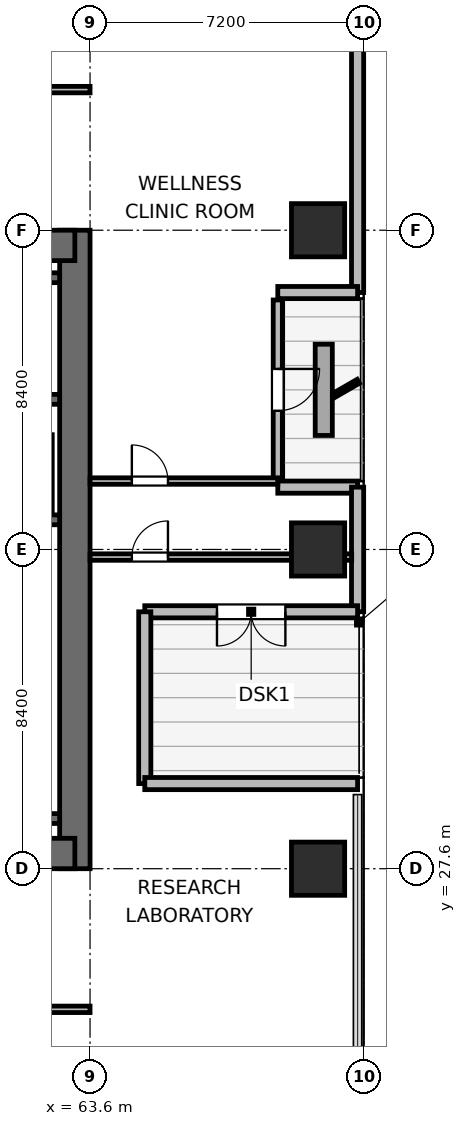
"""IFC4 building model, lengths in metres.
Left out: names, types, materials, properties, quantities, classifications, styles, units other than length and angle.
Written with IfcOpenShell. Run it as: python <this file> out.ifc"""

import sys

from ifc_helpers import new_model, si_unit, direction, frame, frame_2d, origin, origin_2d, place, context, subcontext, project, spatial, rectangle, extrude, element, fill, save


model = new_model("IFC4")
c1 = context("Model", 3, precision=1e-05, world=origin(), true_north=direction((0.0, 1.0)))
c2 = subcontext(c1, "Body", "Model", "MODEL_VIEW")
j1 = project(units=[si_unit("LENGTHUNIT", "METRE"), si_unit("PLANEANGLEUNIT", "RADIAN")], contexts=[c1])
p1 = place(None, origin())
s1 = spatial("IfcSite", under=j1, at=p1, CompositionType="ELEMENT")
p2 = place(p1, origin())
s2 = spatial("IfcBuilding", under=s1, at=p2, CompositionType="ELEMENT")
p3 = place(p2, frame((0.0, 0.0, 125.4)))
s3 = spatial("IfcBuildingStorey", under=s2, at=p3, CompositionType="ELEMENT", Elevation=125.4)
p4 = place(p3, frame((63.2, 27.6, 0.0), z_axis=(0.0, 0.0, 1.0), x_axis=(0.0, 1.0, 0.0)))
e1 = element("IfcWall", 1, at=p4, inside=s3, PredefinedType="SHEAR", context=c2, shape_type="SweptSolid", body=[
    extrude(rectangle(XDim=16.8, YDim=0.8, at=frame_2d((8.4, 0.0))), origin(), (0.0, 0.0, 1.0), 4.5),
])
p5 = place(p3, frame((54.0, 28.0, 0.0), z_axis=(0.0, 0.0, 1.0), x_axis=(1.0, 0.0, 0.0)))
e2 = element("IfcWall", 2, at=p5, inside=s3, PredefinedType="SHEAR", context=c2, shape_type="SweptSolid", body=[
    extrude(rectangle(XDim=9.2, YDim=0.8, at=frame_2d((4.6, 0.0))), origin(), (0.0, 0.0, 1.0), 4.5),
])
p6 = place(p5, frame((3.925, 0.0, 0.0)))
e3 = element("IfcOpeningElement", 3, at=p6, cuts=e2, PredefinedType="OPENING", context=c2, shape_type="SweptSolid", body=[
    extrude(rectangle(XDim=1.05, YDim=2.04, at=frame_2d((0.525, 1.02))), frame((0.0, 0.41, 0.0), z_axis=(0.0, -1.0, 0.0), x_axis=(1.0, 0.0, 0.0)), (0.0, 0.0, 1.0), 0.82),
])
p7 = place(p3, frame((54.0, 44.0, 0.0), z_axis=(0.0, 0.0, 1.0), x_axis=(1.0, 0.0, 0.0)))
e4 = element("IfcWall", 4, at=p7, inside=s3, PredefinedType="SHEAR", context=c2, shape_type="SweptSolid", body=[
    extrude(rectangle(XDim=9.2, YDim=0.8, at=frame_2d((4.6, 0.0))), origin(), (0.0, 0.0, 1.0), 4.5),
])
for number, where, z_axis, x_axis in (
    (5, (58.89, 28.92, 0.0), (0.0, 0.0, 1.0), (1.0, 0.0, 0.0)),
    (6, (58.89, 36.78, 0.0), (0.0, 0.0, 1.0), (1.0, 0.0, 0.0)),
):
    element("IfcWall", number, at=place(p3, frame(where, z_axis=z_axis, x_axis=x_axis)), inside=s3, PredefinedType="SHEAR", context=c2, shape_type="SweptSolid", body=[
        extrude(rectangle(XDim=3.91, YDim=0.26, at=frame_2d((1.955, 0.0))), origin(), (0.0, 0.0, 1.0), 4.5),
    ])
p8 = place(p3, frame((54.4, 39.95, 0.0), z_axis=(0.0, 0.0, 1.0), x_axis=(1.0, 0.0, 0.0)))
e7 = element("IfcWall", 7, at=p8, inside=s3, PredefinedType="SHEAR", context=c2, shape_type="SweptSolid", body=[
    extrude(rectangle(XDim=8.4, YDim=0.26, at=frame_2d((4.2, 0.0))), origin(), (0.0, 0.0, 1.0), 4.5),
])
p9 = place(p8, frame((0.8, 0.0, 0.0)))
e8 = element("IfcOpeningElement", 8, at=p9, cuts=e7, PredefinedType="OPENING", context=c2, shape_type="SweptSolid", body=[
    extrude(rectangle(XDim=1.0, YDim=2.04, at=frame_2d((0.5, 1.02))), frame((0.0, 0.14, 0.0), z_axis=(0.0, -1.0, 0.0), x_axis=(1.0, 0.0, 0.0)), (0.0, 0.0, 1.0), 0.28),
])
p10 = place(p3, frame((54.4, 43.15, 0.0), z_axis=(0.0, 0.0, 1.0), x_axis=(1.0, 0.0, 0.0)))
e9 = element("IfcWall", 9, at=p10, inside=s3, PredefinedType="SHEAR", context=c2, shape_type="SweptSolid", body=[
    extrude(rectangle(XDim=8.4, YDim=0.26, at=frame_2d((4.2, 0.0))), origin(), (0.0, 0.0, 1.0), 4.5),
])
for number, where, z_axis, x_axis in (
    (10, (69.6, 27.6, 0.0), (0.0, 0.0, 1.0), (1.0, 0.0, 0.0)),
    (11, (69.6, 36.0, 0.0), (0.0, 0.0, 1.0), (1.0, 0.0, 0.0)),
    (12, (69.6, 44.4, 0.0), (0.0, 0.0, 1.0), (1.0, 0.0, 0.0)),
):
    element("IfcColumn", number, at=place(p3, frame(where, z_axis=z_axis, x_axis=x_axis)), inside=s3, PredefinedType="COLUMN", context=c2, shape_type="SweptSolid", body=[
        extrude(rectangle(XDim=1.4, YDim=1.4, at=origin_2d()), origin(), (0.0, 0.0, 1.0), 4.5),
    ])
p11 = place(p3, frame((70.64, 56.979, 0.0), z_axis=(0.0, 0.0, 1.0), x_axis=(0.0, -1.0, 0.0)))
e13 = element("IfcWall", 13, at=p11, inside=s3, PredefinedType="SOLIDWALL", context=c2, shape_type="SweptSolid", body=[
    extrude(rectangle(XDim=14.219, YDim=0.32, at=frame_2d((7.109, 0.0))), origin(), (0.0, 0.0, 1.0), 4.24),
])
p12 = place(p3, frame((70.64, 42.76, 0.0), z_axis=(0.0, 0.0, 1.0), x_axis=(-1.0, 0.0, 0.0)))
e14 = element("IfcWall", 14, at=p12, inside=s3, PredefinedType="SOLIDWALL", context=c2, shape_type="SweptSolid", body=[
    extrude(rectangle(XDim=2.1, YDim=0.32, at=frame_2d((1.05, 0.0))), origin(), (0.0, 0.0, 1.0), 3.475),
])
p13 = place(p3, frame((68.54, 42.565, 0.0), z_axis=(0.0, 0.0, 1.0), x_axis=(0.0, -1.0, 0.0)))
e15 = element("IfcWall", 15, at=p13, inside=s3, PredefinedType="SOLIDWALL", context=c2, shape_type="SweptSolid", body=[
    extrude(rectangle(XDim=4.73, YDim=0.24, at=frame_2d((2.365, 0.0))), origin(), (0.0, 0.0, 1.0), 3.762),
])
p14 = place(p13, frame((1.815, 0.0, 0.0)))
e16 = element("IfcOpeningElement", 16, at=p14, cuts=e15, PredefinedType="OPENING", context=c2, shape_type="SweptSolid", body=[
    extrude(rectangle(XDim=1.1, YDim=2.04, at=frame_2d((0.55, 1.02))), frame((0.0, 0.13, 0.0), z_axis=(0.0, -1.0, 0.0), x_axis=(1.0, 0.0, 0.0)), (0.0, 0.0, 1.0), 0.26),
])
p15 = place(p3, frame((68.54, 37.64, 0.0), z_axis=(0.0, 0.0, 1.0), x_axis=(1.0, 0.0, 0.0)))
e17 = element("IfcWall", 17, at=p15, inside=s3, PredefinedType="SOLIDWALL", context=c2, shape_type="SweptSolid", body=[
    extrude(rectangle(XDim=2.1, YDim=0.32, at=frame_2d((1.05, 0.0))), origin(), (0.0, 0.0, 1.0), 3.475),
])
p16 = place(p3, frame((70.64, 37.64, 0.0), z_axis=(0.0, 0.0, 1.0), x_axis=(0.0, -1.0, 0.0)))
e18 = element("IfcWall", 18, at=p16, inside=s3, PredefinedType="SOLIDWALL", context=c2, shape_type="SweptSolid", body=[
    extrude(rectangle(XDim=3.28, YDim=0.32, at=frame_2d((1.64, 0.0))), origin(), (0.0, 0.0, 1.0), 4.24),
])
p17 = place(p3, frame((70.64, 34.36, 0.0), z_axis=(0.0, 0.0, 1.0), x_axis=(-1.0, 0.0, 0.0)))
e19 = element("IfcWall", 19, at=p17, inside=s3, PredefinedType="SOLIDWALL", context=c2, shape_type="SweptSolid", body=[
    extrude(rectangle(XDim=5.6, YDim=0.32, at=frame_2d((2.8, 0.0))), origin(), (0.0, 0.0, 1.0), 3.475),
])
p18 = place(p17, frame((1.9, 0.0, 0.0)))
e20 = element("IfcOpeningElement", 20, at=p18, cuts=e19, PredefinedType="OPENING", context=c2, shape_type="SweptSolid", body=[
    extrude(rectangle(XDim=1.8, YDim=2.1, at=frame_2d((0.9, 1.05))), frame((0.0, 0.17, 0.0), z_axis=(0.0, -1.0, 0.0), x_axis=(1.0, 0.0, 0.0)), (0.0, 0.0, 1.0), 0.34),
])
p19 = place(p3, frame((65.04, 34.36, 0.0), z_axis=(0.0, 0.0, 1.0), x_axis=(0.0, -1.0, 0.0)))
e21 = element("IfcWall", 21, at=p19, inside=s3, PredefinedType="SOLIDWALL", context=c2, shape_type="SweptSolid", body=[
    extrude(rectangle(XDim=4.52, YDim=0.32, at=frame_2d((2.26, 0.0))), origin(), (0.0, 0.0, 1.0), 4.24),
])
p20 = place(p3, frame((65.04, 29.84, 0.0), z_axis=(0.0, 0.0, 1.0), x_axis=(1.0, 0.0, 0.0)))
e22 = element("IfcWall", 22, at=p20, inside=s3, PredefinedType="SOLIDWALL", context=c2, shape_type="SweptSolid", body=[
    extrude(rectangle(XDim=5.6, YDim=0.32, at=frame_2d((2.8, 0.0))), origin(), (0.0, 0.0, 1.0), 3.475),
])
p21 = place(p3, frame((62.5, 36.98, 0.0), z_axis=(0.0, 0.0, 1.0), x_axis=(0.0, 1.0, 0.0)))
e23 = element("IfcWall", 23, at=p21, inside=s3, PredefinedType="PARTITIONING", context=c2, shape_type="SweptSolid", body=[
    extrude(rectangle(XDim=2.04, YDim=0.21, at=frame_2d((1.02, 0.0))), origin(), (0.0, 0.0, 1.0), 4.24),
])
p22 = place(p3, frame((28.975, 23.9, 0.0), z_axis=(0.0, 0.0, 1.0), x_axis=(1.0, 0.0, 0.0)))
e24 = element("IfcWall", 24, at=p22, inside=s3, PredefinedType="PARTITIONING", context=c2, shape_type="SweptSolid", body=[
    extrude(rectangle(XDim=34.625, YDim=0.17, at=frame_2d((17.312, 0.0))), origin(), (0.0, 0.0, 1.0), 4.24),
])
p23 = place(p22, frame((2.813, 0.0, 0.0)))
e25 = element("IfcOpeningElement", 25, at=p23, cuts=e24, PredefinedType="OPENING", context=c2, shape_type="SweptSolid", body=[
    extrude(rectangle(XDim=0.95, YDim=2.04, at=frame_2d((0.475, 1.02))), frame((0.0, 0.095, 0.0), z_axis=(0.0, -1.0, 0.0), x_axis=(1.0, 0.0, 0.0)), (0.0, 0.0, 1.0), 0.19),
])
p24 = place(p22, frame((8.785, 0.0, 0.0)))
e26 = element("IfcOpeningElement", 26, at=p24, cuts=e24, PredefinedType="OPENING", context=c2, shape_type="SweptSolid", body=[
    extrude(rectangle(XDim=0.95, YDim=2.04, at=frame_2d((0.475, 1.02))), frame((0.0, 0.095, 0.0), z_axis=(0.0, -1.0, 0.0), x_axis=(1.0, 0.0, 0.0)), (0.0, 0.0, 1.0), 0.19),
])
p25 = place(p22, frame((14.155, 0.0, 0.0)))
e27 = element("IfcOpeningElement", 27, at=p25, cuts=e24, PredefinedType="OPENING", context=c2, shape_type="SweptSolid", body=[
    extrude(rectangle(XDim=0.95, YDim=2.04, at=frame_2d((0.475, 1.02))), frame((0.0, 0.095, 0.0), z_axis=(0.0, -1.0, 0.0), x_axis=(1.0, 0.0, 0.0)), (0.0, 0.0, 1.0), 0.19),
])
p26 = place(p22, frame((19.525, 0.0, 0.0)))
e28 = element("IfcOpeningElement", 28, at=p26, cuts=e24, PredefinedType="OPENING", context=c2, shape_type="SweptSolid", body=[
    extrude(rectangle(XDim=0.95, YDim=2.04, at=frame_2d((0.475, 1.02))), frame((0.0, 0.095, 0.0), z_axis=(0.0, -1.0, 0.0), x_axis=(1.0, 0.0, 0.0)), (0.0, 0.0, 1.0), 0.19),
])
p27 = place(p22, frame((24.895, 0.0, 0.0)))
e29 = element("IfcOpeningElement", 29, at=p27, cuts=e24, PredefinedType="OPENING", context=c2, shape_type="SweptSolid", body=[
    extrude(rectangle(XDim=0.95, YDim=2.04, at=frame_2d((0.475, 1.02))), frame((0.0, 0.095, 0.0), z_axis=(0.0, -1.0, 0.0), x_axis=(1.0, 0.0, 0.0)), (0.0, 0.0, 1.0), 0.19),
])
p28 = place(p22, frame((30.865, 0.0, 0.0)))
e30 = element("IfcOpeningElement", 30, at=p28, cuts=e24, PredefinedType="OPENING", context=c2, shape_type="SweptSolid", body=[
    extrude(rectangle(XDim=0.95, YDim=2.04, at=frame_2d((0.475, 1.02))), frame((0.0, 0.095, 0.0), z_axis=(0.0, -1.0, 0.0), x_axis=(1.0, 0.0, 0.0)), (0.0, 0.0, 1.0), 0.19),
])
p29 = place(p3, frame((28.975, 48.1, 0.0), z_axis=(0.0, 0.0, 1.0), x_axis=(1.0, 0.0, 0.0)))
e31 = element("IfcWall", 31, at=p29, inside=s3, PredefinedType="PARTITIONING", context=c2, shape_type="SweptSolid", body=[
    extrude(rectangle(XDim=34.625, YDim=0.17, at=frame_2d((17.312, 0.0))), origin(), (0.0, 0.0, 1.0), 4.24),
])
p30 = place(p29, frame((3.158, 0.0, 0.0)))
e32 = element("IfcOpeningElement", 32, at=p30, cuts=e31, PredefinedType="OPENING", context=c2, shape_type="SweptSolid", body=[
    extrude(rectangle(XDim=0.95, YDim=2.04, at=frame_2d((0.475, 1.02))), frame((0.0, 0.095, 0.0), z_axis=(0.0, -1.0, 0.0), x_axis=(1.0, 0.0, 0.0)), (0.0, 0.0, 1.0), 0.19),
])
p31 = place(p29, frame((10.505, 0.0, 0.0)))
e33 = element("IfcOpeningElement", 33, at=p31, cuts=e31, PredefinedType="OPENING", context=c2, shape_type="SweptSolid", body=[
    extrude(rectangle(XDim=0.95, YDim=2.04, at=frame_2d((0.475, 1.02))), frame((0.0, 0.095, 0.0), z_axis=(0.0, -1.0, 0.0), x_axis=(1.0, 0.0, 0.0)), (0.0, 0.0, 1.0), 0.19),
])
p32 = place(p29, frame((15.74, 0.0, 0.0)))
e34 = element("IfcOpeningElement", 34, at=p32, cuts=e31, PredefinedType="OPENING", context=c2, shape_type="SweptSolid", body=[
    extrude(rectangle(XDim=0.95, YDim=2.04, at=frame_2d((0.475, 1.02))), frame((0.0, 0.095, 0.0), z_axis=(0.0, -1.0, 0.0), x_axis=(1.0, 0.0, 0.0)), (0.0, 0.0, 1.0), 0.19),
])
p33 = place(p29, frame((22.07, 0.0, 0.0)))
e35 = element("IfcOpeningElement", 35, at=p33, cuts=e31, PredefinedType="OPENING", context=c2, shape_type="SweptSolid", body=[
    extrude(rectangle(XDim=0.95, YDim=2.04, at=frame_2d((0.475, 1.02))), frame((0.0, 0.095, 0.0), z_axis=(0.0, -1.0, 0.0), x_axis=(1.0, 0.0, 0.0)), (0.0, 0.0, 1.0), 0.19),
])
p34 = place(p29, frame((30.515, 0.0, 0.0)))
e36 = element("IfcOpeningElement", 36, at=p34, cuts=e31, PredefinedType="OPENING", context=c2, shape_type="SweptSolid", body=[
    extrude(rectangle(XDim=0.95, YDim=2.04, at=frame_2d((0.475, 1.02))), frame((0.0, 0.095, 0.0), z_axis=(0.0, -1.0, 0.0), x_axis=(1.0, 0.0, 0.0)), (0.0, 0.0, 1.0), 0.19),
])
p35 = place(p3, frame((63.6, 35.8, 0.0), z_axis=(0.0, 0.0, 1.0), x_axis=(1.0, 0.0, 0.0)))
e37 = element("IfcWall", 37, at=p35, inside=s3, PredefinedType="PARTITIONING", context=c2, shape_type="SweptSolid", body=[
    extrude(rectangle(XDim=6.885, YDim=0.17, at=frame_2d((3.442, 0.0))), origin(), (0.0, 0.0, 1.0), 3.603),
])
p36 = place(p35, frame((1.1, 0.0, 0.0)))
e38 = element("IfcOpeningElement", 38, at=p36, cuts=e37, PredefinedType="OPENING", context=c2, shape_type="SweptSolid", body=[
    extrude(rectangle(XDim=0.95, YDim=2.04, at=frame_2d((0.475, 1.02))), frame((0.0, 0.095, 0.0), z_axis=(0.0, -1.0, 0.0), x_axis=(1.0, 0.0, 0.0)), (0.0, 0.0, 1.0), 0.19),
])
p37 = place(p3, frame((63.6, 37.8, 0.0), z_axis=(0.0, 0.0, 1.0), x_axis=(1.0, 0.0, 0.0)))
e39 = element("IfcWall", 39, at=p37, inside=s3, PredefinedType="PARTITIONING", context=c2, shape_type="SweptSolid", body=[
    extrude(rectangle(XDim=4.94, YDim=0.17, at=frame_2d((2.47, 0.0))), origin(), (0.0, 0.0, 1.0), 4.24),
])
p38 = place(p37, frame((1.1, 0.0, 0.0)))
e40 = element("IfcOpeningElement", 40, at=p38, cuts=e39, PredefinedType="OPENING", context=c2, shape_type="SweptSolid", body=[
    extrude(rectangle(XDim=0.95, YDim=2.04, at=frame_2d((0.475, 1.02))), frame((0.0, 0.095, 0.0), z_axis=(0.0, -1.0, 0.0), x_axis=(1.0, 0.0, 0.0)), (0.0, 0.0, 1.0), 0.19),
])
p39 = place(p14, origin())
e41 = element("IfcDoor", 41, at=p39, inside=s3, OperationType="SINGLE_SWING_LEFT", PredefinedType="DOOR", context=c2, shape_type="SweptSolid", body=[
    extrude(rectangle(XDim=1.1, YDim=2.04, at=frame_2d((0.55, 1.02))), frame((0.0, 0.025, 0.0), z_axis=(0.0, -1.0, 0.0), x_axis=(1.0, 0.0, 0.0)), (0.0, 0.0, 1.0), 0.05),
])
fill(e16, e41)
p40 = place(p18, origin())
e42 = element("IfcDoor", 42, at=p40, inside=s3, OperationType="DOUBLE_DOOR_SINGLE_SWING", PredefinedType="DOOR", context=c2, shape_type="SweptSolid", body=[
    extrude(rectangle(XDim=1.8, YDim=2.1, at=frame_2d((0.9, 1.05))), frame((0.0, 0.025, 0.0), z_axis=(0.0, -1.0, 0.0), x_axis=(1.0, 0.0, 0.0)), (0.0, 0.0, 1.0), 0.05),
])
fill(e20, e42)
p41 = place(p36, origin())
e43 = element("IfcDoor", 43, at=p41, inside=s3, OperationType="SINGLE_SWING_RIGHT", PredefinedType="DOOR", context=c2, shape_type="SweptSolid", body=[
    extrude(rectangle(XDim=0.95, YDim=2.04, at=frame_2d((0.475, 1.02))), frame((0.0, 0.025, 0.0), z_axis=(0.0, -1.0, 0.0), x_axis=(1.0, 0.0, 0.0)), (0.0, 0.0, 1.0), 0.05),
])
fill(e38, e43)
p42 = place(p38, origin())
e44 = element("IfcDoor", 44, at=p42, inside=s3, OperationType="SINGLE_SWING_LEFT", PredefinedType="DOOR", context=c2, shape_type="SweptSolid", body=[
    extrude(rectangle(XDim=0.95, YDim=2.04, at=frame_2d((0.475, 1.02))), frame((0.0, 0.025, 0.0), z_axis=(0.0, -1.0, 0.0), x_axis=(1.0, 0.0, 0.0)), (0.0, 0.0, 1.0), 0.05),
])
fill(e40, e44)
save(model, sys.argv[1])
